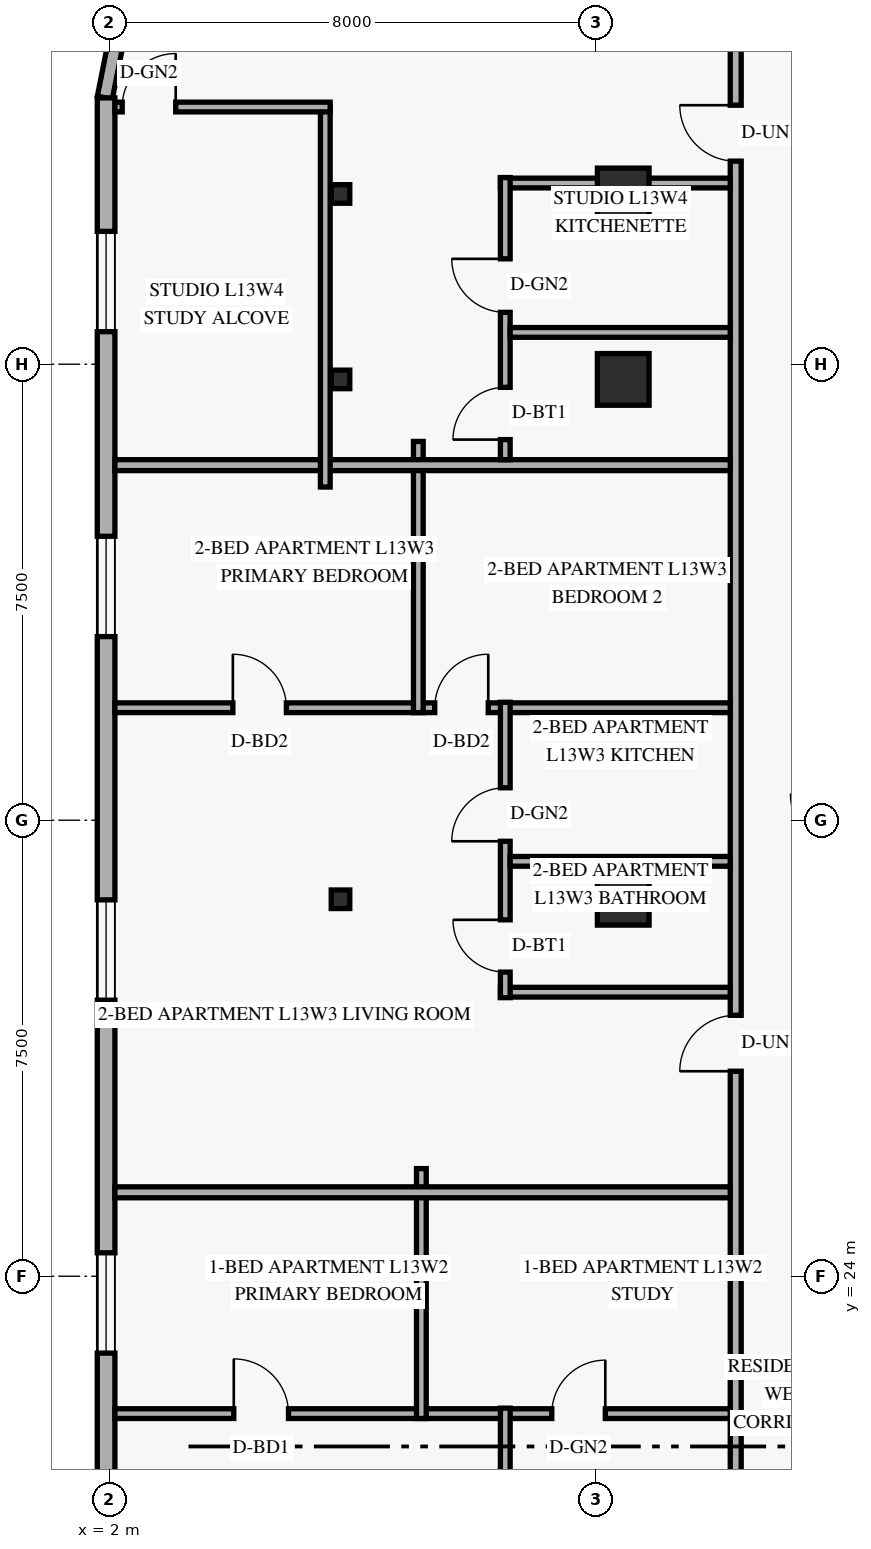
"""IFC4 building model, lengths in metres.
Left out: names, types, materials, properties, quantities, classifications, styles, units other than length and angle.
Written with IfcOpenShell. Run it as: python <this file> out.ifc"""

import sys

from ifc_helpers import new_model, si_unit, direction, frame, frame_2d, origin, origin_2d, place, context, subcontext, project, spatial, rectangle, hollow_rectangle, extrude, element, fill, save


model = new_model("IFC4")
c1 = context("Model", 3, precision=1e-05, world=origin(), true_north=direction((0.0, 1.0)))
c2 = subcontext(c1, "Body", "Model", "MODEL_VIEW")
j1 = project(units=[si_unit("LENGTHUNIT", "METRE"), si_unit("PLANEANGLEUNIT", "RADIAN")], contexts=[c1])
p1 = place(None, origin())
s1 = spatial("IfcSite", under=j1, at=p1, CompositionType="ELEMENT")
p2 = place(p1, origin())
s2 = spatial("IfcBuilding", under=s1, at=p2, CompositionType="ELEMENT")
p3 = place(p2, frame((0.0, 0.0, 52.8)))
s3 = spatial("IfcBuildingStorey", under=s2, at=p3, CompositionType="ELEMENT", Elevation=52.8)
for number, where, z_axis, x_axis in (
    (1, (5.8, 30.2, 0.0), (0.0, 0.0, 1.0), (1.0, 0.0, 0.0)),
    (2, (5.8, 38.75, 0.0), (0.0, 0.0, 1.0), (1.0, 0.0, 0.0)),
    (3, (5.8, 41.8, 0.0), (0.0, 0.0, 1.0), (1.0, 0.0, 0.0)),
):
    element("IfcColumn", number, at=place(p3, frame(where, z_axis=z_axis, x_axis=x_axis)), inside=s3, PredefinedType="COLUMN", context=c2, shape_type="SweptSolid", body=[
        extrude(hollow_rectangle(XDim=0.305, YDim=0.305, WallThickness=0.013, at=origin_2d()), origin(), (0.0, 0.0, 1.0), 3.6),
    ])
for number, where, z_axis, x_axis in (
    (4, (10.45, 30.2, 0.0), (0.0, 0.0, 1.0), (1.0, 0.0, 0.0)),
    (5, (10.45, 38.75, 0.0), (0.0, 0.0, 1.0), (1.0, 0.0, 0.0)),
    (6, (10.45, 41.8, 0.0), (0.0, 0.0, 1.0), (1.0, 0.0, 0.0)),
):
    element("IfcColumn", number, at=place(p3, frame(where, z_axis=z_axis, x_axis=x_axis)), inside=s3, PredefinedType="COLUMN", context=c2, shape_type="SweptSolid", body=[
        extrude(rectangle(XDim=0.85, YDim=0.85, at=origin_2d()), origin(), (0.0, 0.0, 1.0), 3.6),
    ])
p4 = place(p3, frame((2.195, 44.746, 0.0), z_axis=(0.0, 0.0, 1.0), x_axis=(-0.19496651342, -0.980809899341, 0.0)))
e7 = element("IfcWall", 7, at=p4, inside=s3, PredefinedType="SOLIDWALL", context=c2, shape_type="SweptSolid", body=[
    extrude(rectangle(XDim=1.389, YDim=0.25, at=frame_2d((0.694, 0.0))), origin(), (0.0, 0.0, 1.0), 3.36),
])
p5 = place(p3, frame((1.945, 43.38, 0.0), z_axis=(0.0, 0.0, 1.0), x_axis=(0.0, -1.0, 0.0)))
e8 = element("IfcWall", 8, at=p5, inside=s3, PredefinedType="SOLIDWALL", context=c2, shape_type="SweptSolid", body=[
    extrude(rectangle(XDim=38.76, YDim=0.29, at=frame_2d((19.38, 0.0))), origin(), (0.0, 0.0, 1.0), 3.36),
])
p6 = place(p5, frame((33.995, 0.0, 0.85)))
e9 = element("IfcOpeningElement", 9, at=p6, cuts=e8, PredefinedType="OPENING", context=c2, shape_type="SweptSolid", body=[
    extrude(rectangle(XDim=1.65, YDim=1.6, at=frame_2d((0.825, 0.8))), frame((0.0, 0.155, 0.0), z_axis=(0.0, -1.0, 0.0), x_axis=(1.0, 0.0, 0.0)), (0.0, 0.0, 1.0), 0.31),
])
p7 = place(p5, frame((28.81, 0.0, 0.85)))
e10 = element("IfcOpeningElement", 10, at=p7, cuts=e8, PredefinedType="OPENING", context=c2, shape_type="SweptSolid", body=[
    extrude(rectangle(XDim=1.65, YDim=1.6, at=frame_2d((0.825, 0.8))), frame((0.0, 0.155, 0.0), z_axis=(0.0, -1.0, 0.0), x_axis=(1.0, 0.0, 0.0)), (0.0, 0.0, 1.0), 0.31),
])
p8 = place(p5, frame((24.19, 0.0, 0.85)))
e11 = element("IfcOpeningElement", 11, at=p8, cuts=e8, PredefinedType="OPENING", context=c2, shape_type="SweptSolid", body=[
    extrude(rectangle(XDim=1.65, YDim=1.6, at=frame_2d((0.825, 0.8))), frame((0.0, 0.155, 0.0), z_axis=(0.0, -1.0, 0.0), x_axis=(1.0, 0.0, 0.0)), (0.0, 0.0, 1.0), 0.31),
])
p9 = place(p5, frame((18.995, 0.0, 0.85)))
e12 = element("IfcOpeningElement", 12, at=p9, cuts=e8, PredefinedType="OPENING", context=c2, shape_type="SweptSolid", body=[
    extrude(rectangle(XDim=1.65, YDim=1.6, at=frame_2d((0.825, 0.8))), frame((0.0, 0.155, 0.0), z_axis=(0.0, -1.0, 0.0), x_axis=(1.0, 0.0, 0.0)), (0.0, 0.0, 1.0), 0.31),
])
p10 = place(p5, frame((13.19, 0.0, 0.85)))
e13 = element("IfcOpeningElement", 13, at=p10, cuts=e8, PredefinedType="OPENING", context=c2, shape_type="SweptSolid", body=[
    extrude(rectangle(XDim=1.65, YDim=1.6, at=frame_2d((0.825, 0.8))), frame((0.0, 0.155, 0.0), z_axis=(0.0, -1.0, 0.0), x_axis=(1.0, 0.0, 0.0)), (0.0, 0.0, 1.0), 0.31),
])
p11 = place(p5, frame((7.21, 0.0, 0.85)))
e14 = element("IfcOpeningElement", 14, at=p11, cuts=e8, PredefinedType="OPENING", context=c2, shape_type="SweptSolid", body=[
    extrude(rectangle(XDim=1.65, YDim=1.6, at=frame_2d((0.825, 0.8))), frame((0.0, 0.155, 0.0), z_axis=(0.0, -1.0, 0.0), x_axis=(1.0, 0.0, 0.0)), (0.0, 0.0, 1.0), 0.31),
])
p12 = place(p5, frame((2.195, 0.0, 0.85)))
e15 = element("IfcOpeningElement", 15, at=p12, cuts=e8, PredefinedType="OPENING", context=c2, shape_type="SweptSolid", body=[
    extrude(rectangle(XDim=1.65, YDim=1.6, at=frame_2d((0.825, 0.8))), frame((0.0, 0.155, 0.0), z_axis=(0.0, -1.0, 0.0), x_axis=(1.0, 0.0, 0.0)), (0.0, 0.0, 1.0), 0.31),
])
p13 = place(p3, frame((12.3, 1.29, 0.0), z_axis=(0.0, 0.0, 1.0), x_axis=(0.0, 1.0, 0.0)))
e16 = element("IfcWall", 16, at=p13, inside=s3, PredefinedType="STANDARD", context=c2, shape_type="SweptSolid", body=[
    extrude(rectangle(XDim=45.42, YDim=0.18, at=frame_2d((22.71, 0.0))), origin(), (0.0, 0.0, 1.0), 2.649),
])
p14 = place(p13, frame((5.27, 0.0, 0.0)))
e17 = element("IfcOpeningElement", 17, at=p14, cuts=e16, PredefinedType="OPENING", context=c2, shape_type="SweptSolid", body=[
    extrude(rectangle(XDim=0.92, YDim=2.15, at=frame_2d((0.46, 1.075))), frame((0.0, 0.1, 0.0), z_axis=(0.0, -1.0, 0.0), x_axis=(1.0, 0.0, 0.0)), (0.0, 0.0, 1.0), 0.2),
])
p15 = place(p13, frame((14.5, 0.0, 0.0)))
e18 = element("IfcOpeningElement", 18, at=p15, cuts=e16, PredefinedType="OPENING", context=c2, shape_type="SweptSolid", body=[
    extrude(rectangle(XDim=0.92, YDim=2.15, at=frame_2d((0.46, 1.075))), frame((0.0, 0.1, 0.0), z_axis=(0.0, -1.0, 0.0), x_axis=(1.0, 0.0, 0.0)), (0.0, 0.0, 1.0), 0.2),
])
p16 = place(p13, frame((26.082, 0.0, 0.0)))
e19 = element("IfcOpeningElement", 19, at=p16, cuts=e16, PredefinedType="OPENING", context=c2, shape_type="SweptSolid", body=[
    extrude(rectangle(XDim=0.92, YDim=2.15, at=frame_2d((0.46, 1.075))), frame((0.0, 0.1, 0.0), z_axis=(0.0, -1.0, 0.0), x_axis=(1.0, 0.0, 0.0)), (0.0, 0.0, 1.0), 0.2),
])
p17 = place(p13, frame((41.05, 0.0, 0.0)))
e20 = element("IfcOpeningElement", 20, at=p17, cuts=e16, PredefinedType="OPENING", context=c2, shape_type="SweptSolid", body=[
    extrude(rectangle(XDim=0.92, YDim=2.15, at=frame_2d((0.46, 1.075))), frame((0.0, 0.1, 0.0), z_axis=(0.0, -1.0, 0.0), x_axis=(1.0, 0.0, 0.0)), (0.0, 0.0, 1.0), 0.2),
])
p18 = place(p3, frame((2.09, 21.74, 0.0), z_axis=(0.0, 0.0, 1.0), x_axis=(1.0, 0.0, 0.0)))
e21 = element("IfcWall", 21, at=p18, inside=s3, PredefinedType="PARTITIONING", context=c2, shape_type="SweptSolid", body=[
    extrude(rectangle(XDim=10.12, YDim=0.16, at=frame_2d((5.06, 0.0))), origin(), (0.0, 0.0, 1.0), 2.649),
])
p19 = place(p18, frame((7.185, 0.0, 0.0)))
e22 = element("IfcOpeningElement", 22, at=p19, cuts=e21, PredefinedType="OPENING", context=c2, shape_type="SweptSolid", body=[
    extrude(rectangle(XDim=0.88, YDim=2.12, at=frame_2d((0.44, 1.06))), frame((0.0, 0.09, 0.0), z_axis=(0.0, -1.0, 0.0), x_axis=(1.0, 0.0, 0.0)), (0.0, 0.0, 1.0), 0.18),
])
p20 = place(p18, frame((1.955, 0.0, 0.0)))
e23 = element("IfcOpeningElement", 23, at=p20, cuts=e21, PredefinedType="OPENING", context=c2, shape_type="SweptSolid", body=[
    extrude(rectangle(XDim=0.9, YDim=2.14, at=frame_2d((0.45, 1.07))), frame((0.0, 0.09, 0.0), z_axis=(0.0, -1.0, 0.0), x_axis=(1.0, 0.0, 0.0)), (0.0, 0.0, 1.0), 0.18),
])
p21 = place(p3, frame((8.51, 17.0, 0.0), z_axis=(0.0, 0.0, 1.0), x_axis=(0.0, 1.0, 0.0)))
e24 = element("IfcWall", 24, at=p21, inside=s3, PredefinedType="PLUMBINGWALL", context=c2, shape_type="SweptSolid", body=[
    extrude(rectangle(XDim=4.83, YDim=0.16, at=frame_2d((2.415, 0.0))), origin(), (0.0, 0.0, 1.0), 2.649),
])
p22 = place(p21, frame((0.42, 0.0, 0.0)))
e25 = element("IfcOpeningElement", 25, at=p22, cuts=e24, PredefinedType="OPENING", context=c2, shape_type="SweptSolid", body=[
    extrude(rectangle(XDim=0.86, YDim=2.12, at=frame_2d((0.43, 1.06))), frame((0.0, 0.09, 0.0), z_axis=(0.0, -1.0, 0.0), x_axis=(1.0, 0.0, 0.0)), (0.0, 0.0, 1.0), 0.18),
])
p23 = place(p21, frame((2.559, 0.0, 0.0)))
e26 = element("IfcOpeningElement", 26, at=p23, cuts=e24, PredefinedType="OPENING", context=c2, shape_type="SweptSolid", body=[
    extrude(rectangle(XDim=0.88, YDim=2.12, at=frame_2d((0.44, 1.06))), frame((0.0, 0.09, 0.0), z_axis=(0.0, -1.0, 0.0), x_axis=(1.0, 0.0, 0.0)), (0.0, 0.0, 1.0), 0.18),
])
p24 = place(p3, frame((7.13, 21.66, 0.0), z_axis=(0.0, 0.0, 1.0), x_axis=(0.0, 1.0, 0.0)))
e27 = element("IfcWall", 27, at=p24, inside=s3, PredefinedType="PARTITIONING", context=c2, shape_type="SweptSolid", body=[
    extrude(rectangle(XDim=4.11, YDim=0.16, at=frame_2d((2.055, 0.0))), origin(), (0.0, 0.0, 1.0), 3.36),
])
p25 = place(p3, frame((2.09, 25.38, 0.0), z_axis=(0.0, 0.0, 1.0), x_axis=(1.0, 0.0, 0.0)))
e28 = element("IfcWall", 28, at=p25, inside=s3, PredefinedType="PARTITIONING", context=c2, shape_type="SweptSolid", body=[
    extrude(rectangle(XDim=10.12, YDim=0.18, at=frame_2d((5.06, 0.0))), origin(), (0.0, 0.0, 1.0), 2.649),
])
p26 = place(p3, frame((2.09, 33.35, 0.0), z_axis=(0.0, 0.0, 1.0), x_axis=(1.0, 0.0, 0.0)))
e29 = element("IfcWall", 29, at=p26, inside=s3, PredefinedType="PARTITIONING", context=c2, shape_type="SweptSolid", body=[
    extrude(rectangle(XDim=10.12, YDim=0.16, at=frame_2d((5.06, 0.0))), origin(), (0.0, 0.0, 1.0), 2.649),
])
p27 = place(p26, frame((1.94, 0.0, 0.0)))
e30 = element("IfcOpeningElement", 30, at=p27, cuts=e29, PredefinedType="OPENING", context=c2, shape_type="SweptSolid", body=[
    extrude(rectangle(XDim=0.88, YDim=2.14, at=frame_2d((0.44, 1.07))), frame((0.0, 0.09, 0.0), z_axis=(0.0, -1.0, 0.0), x_axis=(1.0, 0.0, 0.0)), (0.0, 0.0, 1.0), 0.18),
])
p28 = place(p26, frame((5.26, 0.0, 0.0)))
e31 = element("IfcOpeningElement", 31, at=p28, cuts=e29, PredefinedType="OPENING", context=c2, shape_type="SweptSolid", body=[
    extrude(rectangle(XDim=0.88, YDim=2.14, at=frame_2d((0.44, 1.07))), frame((0.0, 0.09, 0.0), z_axis=(0.0, -1.0, 0.0), x_axis=(1.0, 0.0, 0.0)), (0.0, 0.0, 1.0), 0.18),
])
p29 = place(p3, frame((8.43, 28.671, 0.0), z_axis=(0.0, 0.0, 1.0), x_axis=(1.0, 0.0, 0.0)))
e32 = element("IfcWall", 32, at=p29, inside=s3, PredefinedType="PLUMBINGWALL", context=c2, shape_type="SweptSolid", body=[
    extrude(rectangle(XDim=3.78, YDim=0.16, at=frame_2d((1.89, 0.0))), origin(), (0.0, 0.0, 1.0), 2.649),
])
p30 = place(p3, frame((8.51, 28.582, 0.0), z_axis=(0.0, 0.0, 1.0), x_axis=(0.0, 1.0, 0.0)))
e33 = element("IfcWall", 33, at=p30, inside=s3, PredefinedType="PLUMBINGWALL", context=c2, shape_type="SweptSolid", body=[
    extrude(rectangle(XDim=4.858, YDim=0.16, at=frame_2d((2.429, 0.0))), origin(), (0.0, 0.0, 1.0), 2.649),
])
p31 = place(p30, frame((0.42, 0.0, 0.0)))
e34 = element("IfcOpeningElement", 34, at=p31, cuts=e33, PredefinedType="OPENING", context=c2, shape_type="SweptSolid", body=[
    extrude(rectangle(XDim=0.86, YDim=2.12, at=frame_2d((0.43, 1.06))), frame((0.0, 0.09, 0.0), z_axis=(0.0, -1.0, 0.0), x_axis=(1.0, 0.0, 0.0)), (0.0, 0.0, 1.0), 0.18),
])
p32 = place(p30, frame((2.572, 0.0, 0.0)))
e35 = element("IfcOpeningElement", 35, at=p32, cuts=e33, PredefinedType="OPENING", context=c2, shape_type="SweptSolid", body=[
    extrude(rectangle(XDim=0.88, YDim=2.12, at=frame_2d((0.44, 1.06))), frame((0.0, 0.09, 0.0), z_axis=(0.0, -1.0, 0.0), x_axis=(1.0, 0.0, 0.0)), (0.0, 0.0, 1.0), 0.18),
])
p33 = place(p3, frame((8.59, 30.823, 0.0), z_axis=(0.0, 0.0, 1.0), x_axis=(1.0, 0.0, 0.0)))
e36 = element("IfcWall", 36, at=p33, inside=s3, PredefinedType="PLUMBINGWALL", context=c2, shape_type="SweptSolid", body=[
    extrude(rectangle(XDim=3.62, YDim=0.16, at=frame_2d((1.81, 0.0))), origin(), (0.0, 0.0, 1.0), 2.649),
])
p34 = place(p3, frame((7.08, 33.27, 0.0), z_axis=(0.0, 0.0, 1.0), x_axis=(0.0, 1.0, 0.0)))
e37 = element("IfcWall", 37, at=p34, inside=s3, PredefinedType="PARTITIONING", context=c2, shape_type="SweptSolid", body=[
    extrude(rectangle(XDim=4.46, YDim=0.16, at=frame_2d((2.23, 0.0))), origin(), (0.0, 0.0, 1.0), 2.932),
])
p35 = place(p3, frame((2.09, 37.34, 0.0), z_axis=(0.0, 0.0, 1.0), x_axis=(1.0, 0.0, 0.0)))
e38 = element("IfcWall", 38, at=p35, inside=s3, PredefinedType="PARTITIONING", context=c2, shape_type="SweptSolid", body=[
    extrude(rectangle(XDim=10.12, YDim=0.18, at=frame_2d((5.06, 0.0))), origin(), (0.0, 0.0, 1.0), 2.649),
])
p36 = place(p3, frame((8.43, 41.98, 0.0), z_axis=(0.0, 0.0, 1.0), x_axis=(1.0, 0.0, 0.0)))
e39 = element("IfcWall", 39, at=p36, inside=s3, PredefinedType="PLUMBINGWALL", context=c2, shape_type="SweptSolid", body=[
    extrude(rectangle(XDim=3.78, YDim=0.16, at=frame_2d((1.89, 0.0))), origin(), (0.0, 0.0, 1.0), 2.809),
])
p37 = place(p3, frame((8.51, 37.43, 0.0), z_axis=(0.0, 0.0, 1.0), x_axis=(0.0, 1.0, 0.0)))
e40 = element("IfcWall", 40, at=p37, inside=s3, PredefinedType="PLUMBINGWALL", context=c2, shape_type="SweptSolid", body=[
    extrude(rectangle(XDim=4.64, YDim=0.16, at=frame_2d((2.32, 0.0))), origin(), (0.0, 0.0, 1.0), 2.649),
])
p38 = place(p37, frame((0.33, 0.0, 0.0)))
e41 = element("IfcOpeningElement", 41, at=p38, cuts=e40, PredefinedType="OPENING", context=c2, shape_type="SweptSolid", body=[
    extrude(rectangle(XDim=0.86, YDim=2.12, at=frame_2d((0.43, 1.06))), frame((0.0, 0.09, 0.0), z_axis=(0.0, -1.0, 0.0), x_axis=(1.0, 0.0, 0.0)), (0.0, 0.0, 1.0), 0.18),
])
p39 = place(p37, frame((2.423, 0.0, 0.0)))
e42 = element("IfcOpeningElement", 42, at=p39, cuts=e40, PredefinedType="OPENING", context=c2, shape_type="SweptSolid", body=[
    extrude(rectangle(XDim=0.88, YDim=2.12, at=frame_2d((0.44, 1.06))), frame((0.0, 0.09, 0.0), z_axis=(0.0, -1.0, 0.0), x_axis=(1.0, 0.0, 0.0)), (0.0, 0.0, 1.0), 0.18),
])
p40 = place(p3, frame((8.59, 39.523, 0.0), z_axis=(0.0, 0.0, 1.0), x_axis=(1.0, 0.0, 0.0)))
e43 = element("IfcWall", 43, at=p40, inside=s3, PredefinedType="PLUMBINGWALL", context=c2, shape_type="SweptSolid", body=[
    extrude(rectangle(XDim=3.62, YDim=0.16, at=frame_2d((1.81, 0.0))), origin(), (0.0, 0.0, 1.0), 2.649),
])
p41 = place(p3, frame((5.55, 36.98, 0.0), z_axis=(0.0, 0.0, 1.0), x_axis=(0.0, 1.0, 0.0)))
e44 = element("IfcWall", 44, at=p41, inside=s3, PredefinedType="PARTITIONING", context=c2, shape_type="SweptSolid", body=[
    extrude(rectangle(XDim=6.25, YDim=0.16, at=frame_2d((3.125, 0.0))), origin(), (0.0, 0.0, 1.0), 3.36),
])
p42 = place(p3, frame((2.09, 43.23, 0.0), z_axis=(0.0, 0.0, 1.0), x_axis=(1.0, 0.0, 0.0)))
e45 = element("IfcWall", 45, at=p42, inside=s3, PredefinedType="PARTITIONING", context=c2, shape_type="SweptSolid", body=[
    extrude(rectangle(XDim=3.54, YDim=0.16, at=frame_2d((1.77, 0.0))), origin(), (0.0, 0.0, 1.0), 3.36),
])
p43 = place(p42, frame((0.12, 0.0, 0.0)))
e46 = element("IfcOpeningElement", 46, at=p43, cuts=e45, PredefinedType="OPENING", context=c2, shape_type="SweptSolid", body=[
    extrude(rectangle(XDim=0.88, YDim=2.12, at=frame_2d((0.44, 1.06))), frame((0.0, 0.09, 0.0), z_axis=(0.0, -1.0, 0.0), x_axis=(1.0, 0.0, 0.0)), (0.0, 0.0, 1.0), 0.18),
])
p44 = place(p9, origin())
e47 = element("IfcWindow", 47, at=p44, inside=s3, PartitioningType="SINGLE_PANEL", PredefinedType="WINDOW", context=c2, shape_type="SweptSolid", body=[
    extrude(rectangle(XDim=1.65, YDim=1.6, at=frame_2d((0.825, 0.8))), frame((0.0, 0.03, 0.0), z_axis=(0.0, -1.0, 0.0), x_axis=(1.0, 0.0, 0.0)), (0.0, 0.0, 1.0), 0.06),
])
fill(e12, e47)
p45 = place(p10, origin())
e48 = element("IfcWindow", 48, at=p45, inside=s3, PartitioningType="SINGLE_PANEL", PredefinedType="WINDOW", context=c2, shape_type="SweptSolid", body=[
    extrude(rectangle(XDim=1.65, YDim=1.6, at=frame_2d((0.825, 0.8))), frame((0.0, 0.03, 0.0), z_axis=(0.0, -1.0, 0.0), x_axis=(1.0, 0.0, 0.0)), (0.0, 0.0, 1.0), 0.06),
])
fill(e13, e48)
p46 = place(p11, origin())
e49 = element("IfcWindow", 49, at=p46, inside=s3, PartitioningType="SINGLE_PANEL", PredefinedType="WINDOW", context=c2, shape_type="SweptSolid", body=[
    extrude(rectangle(XDim=1.65, YDim=1.6, at=frame_2d((0.825, 0.8))), frame((0.0, 0.03, 0.0), z_axis=(0.0, -1.0, 0.0), x_axis=(1.0, 0.0, 0.0)), (0.0, 0.0, 1.0), 0.06),
])
fill(e14, e49)
p47 = place(p12, origin())
e50 = element("IfcWindow", 50, at=p47, inside=s3, PartitioningType="SINGLE_PANEL", PredefinedType="WINDOW", context=c2, shape_type="SweptSolid", body=[
    extrude(rectangle(XDim=1.65, YDim=1.6, at=frame_2d((0.825, 0.8))), frame((0.0, 0.03, 0.0), z_axis=(0.0, -1.0, 0.0), x_axis=(1.0, 0.0, 0.0)), (0.0, 0.0, 1.0), 0.06),
])
fill(e15, e50)
p48 = place(p19, origin())
e51 = element("IfcDoor", 51, at=p48, inside=s3, OperationType="SINGLE_SWING_RIGHT", PredefinedType="DOOR", context=c2, shape_type="SweptSolid", body=[
    extrude(rectangle(XDim=0.88, YDim=2.12, at=frame_2d((0.44, 1.06))), frame((0.0, 0.025, 0.0), z_axis=(0.0, -1.0, 0.0), x_axis=(1.0, 0.0, 0.0)), (0.0, 0.0, 1.0), 0.05),
])
fill(e22, e51)
p49 = place(p20, origin())
e52 = element("IfcDoor", 52, at=p49, inside=s3, OperationType="SINGLE_SWING_LEFT", PredefinedType="DOOR", context=c2, shape_type="SweptSolid", body=[
    extrude(rectangle(XDim=0.9, YDim=2.14, at=frame_2d((0.45, 1.07))), frame((0.0, 0.025, 0.0), z_axis=(0.0, -1.0, 0.0), x_axis=(1.0, 0.0, 0.0)), (0.0, 0.0, 1.0), 0.05),
])
fill(e23, e52)
p50 = place(p16, origin())
e53 = element("IfcDoor", 53, at=p50, inside=s3, OperationType="SINGLE_SWING_LEFT", PredefinedType="DOOR", context=c2, shape_type="SweptSolid", body=[
    extrude(rectangle(XDim=0.92, YDim=2.15, at=frame_2d((0.46, 1.075))), frame((0.0, 0.025, 0.0), z_axis=(0.0, -1.0, 0.0), x_axis=(1.0, 0.0, 0.0)), (0.0, 0.0, 1.0), 0.05),
])
fill(e19, e53)
p51 = place(p31, origin())
e54 = element("IfcDoor", 54, at=p51, inside=s3, OperationType="SINGLE_SWING_RIGHT", PredefinedType="DOOR", context=c2, shape_type="SweptSolid", body=[
    extrude(rectangle(XDim=0.86, YDim=2.12, at=frame_2d((0.43, 1.06))), frame((0.0, 0.025, 0.0), z_axis=(0.0, -1.0, 0.0), x_axis=(1.0, 0.0, 0.0)), (0.0, 0.0, 1.0), 0.05),
])
fill(e34, e54)
p52 = place(p32, origin())
e55 = element("IfcDoor", 55, at=p52, inside=s3, OperationType="SINGLE_SWING_LEFT", PredefinedType="DOOR", context=c2, shape_type="SweptSolid", body=[
    extrude(rectangle(XDim=0.88, YDim=2.12, at=frame_2d((0.44, 1.06))), frame((0.0, 0.025, 0.0), z_axis=(0.0, -1.0, 0.0), x_axis=(1.0, 0.0, 0.0)), (0.0, 0.0, 1.0), 0.05),
])
fill(e35, e55)
p53 = place(p27, origin())
e56 = element("IfcDoor", 56, at=p53, inside=s3, OperationType="SINGLE_SWING_LEFT", PredefinedType="DOOR", context=c2, shape_type="SweptSolid", body=[
    extrude(rectangle(XDim=0.88, YDim=2.14, at=frame_2d((0.44, 1.07))), frame((0.0, 0.025, 0.0), z_axis=(0.0, -1.0, 0.0), x_axis=(1.0, 0.0, 0.0)), (0.0, 0.0, 1.0), 0.05),
])
fill(e30, e56)
p54 = place(p28, origin())
e57 = element("IfcDoor", 57, at=p54, inside=s3, OperationType="SINGLE_SWING_RIGHT", PredefinedType="DOOR", context=c2, shape_type="SweptSolid", body=[
    extrude(rectangle(XDim=0.88, YDim=2.14, at=frame_2d((0.44, 1.07))), frame((0.0, 0.025, 0.0), z_axis=(0.0, -1.0, 0.0), x_axis=(1.0, 0.0, 0.0)), (0.0, 0.0, 1.0), 0.05),
])
fill(e31, e57)
p55 = place(p43, frame((0.88, 0.0, 0.0), z_axis=(0.0, 0.0, 1.0), x_axis=(-1.0, 0.0, 0.0)))
e58 = element("IfcDoor", 58, at=p55, inside=s3, OperationType="SINGLE_SWING_LEFT", PredefinedType="DOOR", context=c2, shape_type="SweptSolid", body=[
    extrude(rectangle(XDim=0.88, YDim=2.12, at=frame_2d((0.44, 1.06))), frame((0.0, 0.025, 0.0), z_axis=(0.0, -1.0, 0.0), x_axis=(1.0, 0.0, 0.0)), (0.0, 0.0, 1.0), 0.05),
])
fill(e46, e58)
p56 = place(p17, origin())
e59 = element("IfcDoor", 59, at=p56, inside=s3, OperationType="SINGLE_SWING_RIGHT", PredefinedType="DOOR", context=c2, shape_type="SweptSolid", body=[
    extrude(rectangle(XDim=0.92, YDim=2.15, at=frame_2d((0.46, 1.075))), frame((0.0, 0.025, 0.0), z_axis=(0.0, -1.0, 0.0), x_axis=(1.0, 0.0, 0.0)), (0.0, 0.0, 1.0), 0.05),
])
fill(e20, e59)
p57 = place(p38, origin())
e60 = element("IfcDoor", 60, at=p57, inside=s3, OperationType="SINGLE_SWING_LEFT", PredefinedType="DOOR", context=c2, shape_type="SweptSolid", body=[
    extrude(rectangle(XDim=0.86, YDim=2.12, at=frame_2d((0.43, 1.06))), frame((0.0, 0.025, 0.0), z_axis=(0.0, -1.0, 0.0), x_axis=(1.0, 0.0, 0.0)), (0.0, 0.0, 1.0), 0.05),
])
fill(e41, e60)
p58 = place(p39, origin())
e61 = element("IfcDoor", 61, at=p58, inside=s3, OperationType="SINGLE_SWING_RIGHT", PredefinedType="DOOR", context=c2, shape_type="SweptSolid", body=[
    extrude(rectangle(XDim=0.88, YDim=2.12, at=frame_2d((0.44, 1.06))), frame((0.0, 0.025, 0.0), z_axis=(0.0, -1.0, 0.0), x_axis=(1.0, 0.0, 0.0)), (0.0, 0.0, 1.0), 0.05),
])
fill(e42, e61)
save(model, sys.argv[1])
